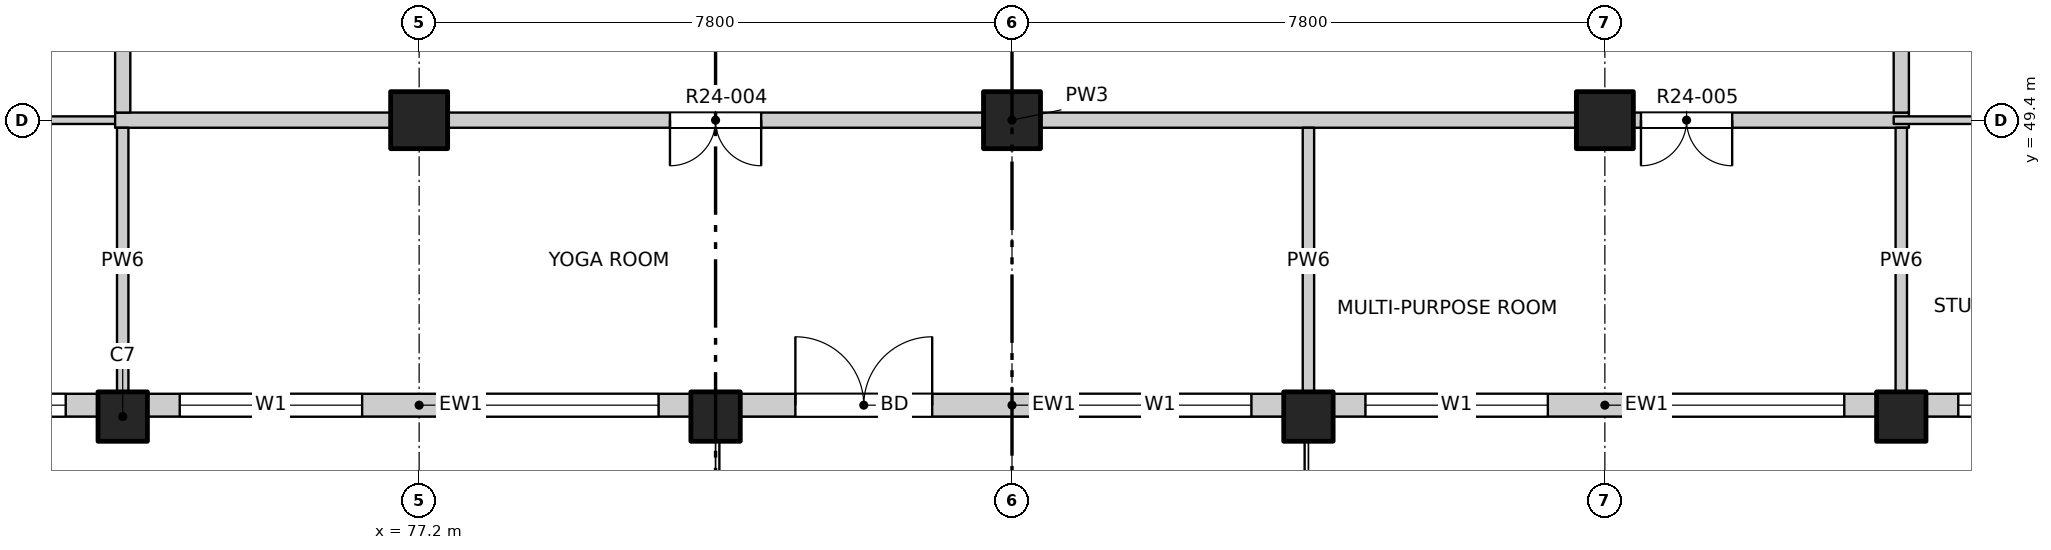
"""IFC4 building model, lengths in metres.
Left out: names, types, materials, properties, quantities, classifications, styles, units other than length and angle.
Written with IfcOpenShell. Run it as: python <this file> out.ifc"""

import sys

from ifc_helpers import new_model, si_unit, direction, frame, frame_2d, origin, origin_2d, place, context, subcontext, project, spatial, rectangle, extrude, element, fill, save


model = new_model("IFC4")
c1 = context("Model", 3, precision=1e-05, world=origin(), true_north=direction((0.0, 1.0)))
c2 = subcontext(c1, "Body", "Model", "MODEL_VIEW")
j1 = project(units=[si_unit("LENGTHUNIT", "METRE"), si_unit("PLANEANGLEUNIT", "RADIAN")], contexts=[c1])
p1 = place(None, origin())
s1 = spatial("IfcSite", under=j1, at=p1, CompositionType="ELEMENT")
p2 = place(p1, origin())
s2 = spatial("IfcBuilding", under=s1, at=p2, CompositionType="ELEMENT")
p3 = place(p2, frame((0.0, 0.0, 249.4)))
s3 = spatial("IfcBuildingStorey", under=s2, at=p3, CompositionType="ELEMENT", Elevation=249.4)
for number, where, z_axis, x_axis in (
    (1, (73.3, 45.5, -0.25), (0.0, 0.0, 1.0), (1.0, 0.0, 0.0)),
    (2, (81.1, 45.5, -0.25), (0.0, 0.0, 1.0), (1.0, 0.0, 0.0)),
    (3, (88.9, 45.5, -0.25), (0.0, 0.0, 1.0), (1.0, 0.0, 0.0)),
    (4, (96.7, 45.5, -0.25), (0.0, 0.0, 1.0), (1.0, 0.0, 0.0)),
):
    element("IfcColumn", number, at=place(p3, frame(where, z_axis=z_axis, x_axis=x_axis)), inside=s3, PredefinedType="COLUMN", context=c2, shape_type="SweptSolid", body=[
        extrude(rectangle(XDim=0.65, YDim=0.65, at=origin_2d()), origin(), (0.0, 0.0, 1.0), 3.4),
    ])
for number, where, z_axis, x_axis in (
    (5, (77.2, 49.4, -0.25), (0.0, 0.0, 1.0), (1.0, 0.0, 0.0)),
    (6, (85.0, 49.4, -0.25), (0.0, 0.0, 1.0), (1.0, 0.0, 0.0)),
    (7, (92.8, 49.4, -0.25), (0.0, 0.0, 1.0), (1.0, 0.0, 0.0)),
):
    element("IfcColumn", number, at=place(p3, frame(where, z_axis=z_axis, x_axis=x_axis)), inside=s3, PredefinedType="COLUMN", context=c2, shape_type="SweptSolid", body=[
        extrude(rectangle(XDim=0.75, YDim=0.75, at=origin_2d()), origin(), (0.0, 0.0, 1.0), 3.4),
    ])
p4 = place(p3, frame((69.4, 45.65, 0.0), z_axis=(0.0, 0.0, 1.0), x_axis=(1.0, 0.0, 0.0)))
e8 = element("IfcWall", 8, at=p4, inside=s3, PredefinedType="SOLIDWALL", context=c2, shape_type="SweptSolid", body=[
    extrude(rectangle(XDim=3.575, YDim=0.3, at=frame_2d((1.788, 0.0))), origin(), (0.0, 0.0, 1.0), 2.7),
])
p5 = place(p4, frame((0.75, 0.0, 0.9)))
e9 = element("IfcOpeningElement", 9, at=p5, cuts=e8, PredefinedType="OPENING", context=c2, shape_type="SweptSolid", body=[
    extrude(rectangle(XDim=2.4, YDim=1.8, at=frame_2d((1.2, 0.9))), frame((0.0, 0.16, 0.0), z_axis=(0.0, -1.0, 0.0), x_axis=(1.0, 0.0, 0.0)), (0.0, 0.0, 1.0), 0.32),
])
p6 = place(p3, frame((73.625, 45.65, 0.0), z_axis=(0.0, 0.0, 1.0), x_axis=(1.0, 0.0, 0.0)))
e10 = element("IfcWall", 10, at=p6, inside=s3, PredefinedType="SOLIDWALL", context=c2, shape_type="SweptSolid", body=[
    extrude(rectangle(XDim=7.15, YDim=0.3, at=frame_2d((3.575, 0.0))), origin(), (0.0, 0.0, 1.0), 2.7),
])
p7 = place(p6, frame((0.425, 0.0, 0.9)))
e11 = element("IfcOpeningElement", 11, at=p7, cuts=e10, PredefinedType="OPENING", context=c2, shape_type="SweptSolid", body=[
    extrude(rectangle(XDim=2.4, YDim=1.8, at=frame_2d((1.2, 0.9))), frame((0.0, 0.16, 0.0), z_axis=(0.0, -1.0, 0.0), x_axis=(1.0, 0.0, 0.0)), (0.0, 0.0, 1.0), 0.32),
])
p8 = place(p6, frame((4.325, 0.0, 0.9)))
e12 = element("IfcOpeningElement", 12, at=p8, cuts=e10, PredefinedType="OPENING", context=c2, shape_type="SweptSolid", body=[
    extrude(rectangle(XDim=2.4, YDim=1.8, at=frame_2d((1.2, 0.9))), frame((0.0, 0.16, 0.0), z_axis=(0.0, -1.0, 0.0), x_axis=(1.0, 0.0, 0.0)), (0.0, 0.0, 1.0), 0.32),
])
p9 = place(p3, frame((81.425, 45.65, 0.0), z_axis=(0.0, 0.0, 1.0), x_axis=(1.0, 0.0, 0.0)))
e13 = element("IfcWall", 13, at=p9, inside=s3, PredefinedType="SOLIDWALL", context=c2, shape_type="SweptSolid", body=[
    extrude(rectangle(XDim=7.15, YDim=0.3, at=frame_2d((3.575, 0.0))), origin(), (0.0, 0.0, 1.0), 2.7),
])
p10 = place(p9, frame((0.725, 0.0, 0.0)))
e14 = element("IfcOpeningElement", 14, at=p10, cuts=e13, PredefinedType="OPENING", context=c2, shape_type="SweptSolid", body=[
    extrude(rectangle(XDim=1.8, YDim=2.4, at=frame_2d((0.9, 1.2))), frame((0.0, 0.16, 0.0), z_axis=(0.0, -1.0, 0.0), x_axis=(1.0, 0.0, 0.0)), (0.0, 0.0, 1.0), 0.32),
])
p11 = place(p9, frame((4.325, 0.0, 0.9)))
e15 = element("IfcOpeningElement", 15, at=p11, cuts=e13, PredefinedType="OPENING", context=c2, shape_type="SweptSolid", body=[
    extrude(rectangle(XDim=2.4, YDim=1.8, at=frame_2d((1.2, 0.9))), frame((0.0, 0.16, 0.0), z_axis=(0.0, -1.0, 0.0), x_axis=(1.0, 0.0, 0.0)), (0.0, 0.0, 1.0), 0.32),
])
p12 = place(p3, frame((89.225, 45.65, 0.0), z_axis=(0.0, 0.0, 1.0), x_axis=(1.0, 0.0, 0.0)))
e16 = element("IfcWall", 16, at=p12, inside=s3, PredefinedType="SOLIDWALL", context=c2, shape_type="SweptSolid", body=[
    extrude(rectangle(XDim=7.15, YDim=0.3, at=frame_2d((3.575, 0.0))), origin(), (0.0, 0.0, 1.0), 2.7),
])
p13 = place(p12, frame((0.425, 0.0, 0.9)))
e17 = element("IfcOpeningElement", 17, at=p13, cuts=e16, PredefinedType="OPENING", context=c2, shape_type="SweptSolid", body=[
    extrude(rectangle(XDim=2.4, YDim=1.8, at=frame_2d((1.2, 0.9))), frame((0.0, 0.16, 0.0), z_axis=(0.0, -1.0, 0.0), x_axis=(1.0, 0.0, 0.0)), (0.0, 0.0, 1.0), 0.32),
])
p14 = place(p12, frame((4.325, 0.0, 0.9)))
e18 = element("IfcOpeningElement", 18, at=p14, cuts=e16, PredefinedType="OPENING", context=c2, shape_type="SweptSolid", body=[
    extrude(rectangle(XDim=2.4, YDim=1.8, at=frame_2d((1.2, 0.9))), frame((0.0, 0.16, 0.0), z_axis=(0.0, -1.0, 0.0), x_axis=(1.0, 0.0, 0.0)), (0.0, 0.0, 1.0), 0.32),
])
p15 = place(p3, frame((97.025, 45.65, 0.0), z_axis=(0.0, 0.0, 1.0), x_axis=(1.0, 0.0, 0.0)))
e19 = element("IfcWall", 19, at=p15, inside=s3, PredefinedType="SOLIDWALL", context=c2, shape_type="SweptSolid", body=[
    extrude(rectangle(XDim=3.575, YDim=0.3, at=frame_2d((1.788, 0.0))), origin(), (0.0, 0.0, 1.0), 2.7),
])
p16 = place(p15, frame((0.425, 0.0, 0.9)))
e20 = element("IfcOpeningElement", 20, at=p16, cuts=e19, PredefinedType="OPENING", context=c2, shape_type="SweptSolid", body=[
    extrude(rectangle(XDim=2.4, YDim=1.8, at=frame_2d((1.2, 0.9))), frame((0.0, 0.16, 0.0), z_axis=(0.0, -1.0, 0.0), x_axis=(1.0, 0.0, 0.0)), (0.0, 0.0, 1.0), 0.32),
])
p17 = place(p3, frame((65.8, 49.4, 0.0), z_axis=(0.0, 0.0, 1.0), x_axis=(1.0, 0.0, 0.0)))
e21 = element("IfcWall", 21, at=p17, inside=s3, PredefinedType="PARTITIONING", context=c2, shape_type="SweptSolid", body=[
    extrude(rectangle(XDim=7.6, YDim=0.1, at=frame_2d((3.8, 0.0))), origin(), (0.0, 0.0, 1.0), 3.15),
])
p18 = place(p17, frame((4.09, 0.0, 0.0)))
e22 = element("IfcOpeningElement", 22, at=p18, cuts=e21, PredefinedType="OPENING", context=c2, shape_type="SweptSolid", body=[
    extrude(rectangle(XDim=0.9, YDim=2.1, at=frame_2d((0.45, 1.05))), frame((0.0, 0.06, 0.0), z_axis=(0.0, -1.0, 0.0), x_axis=(1.0, 0.0, 0.0)), (0.0, 0.0, 1.0), 0.12),
])
p19 = place(p3, frame((73.2, 49.4, 0.0), z_axis=(0.0, 0.0, 1.0), x_axis=(1.0, 0.0, 0.0)))
e23 = element("IfcWall", 23, at=p19, inside=s3, PredefinedType="PARTITIONING", context=c2, shape_type="SweptSolid", body=[
    extrude(rectangle(XDim=23.6, YDim=0.2, at=frame_2d((11.8, 0.0))), origin(), (0.0, 0.0, 1.0), 3.15),
])
p20 = place(p19, frame((7.3, 0.0, 0.0)))
e24 = element("IfcOpeningElement", 24, at=p20, cuts=e23, PredefinedType="OPENING", context=c2, shape_type="SweptSolid", body=[
    extrude(rectangle(XDim=1.2, YDim=2.1, at=frame_2d((0.6, 1.05))), frame((0.0, 0.11, 0.0), z_axis=(0.0, -1.0, 0.0), x_axis=(1.0, 0.0, 0.0)), (0.0, 0.0, 1.0), 0.22),
])
p21 = place(p19, frame((20.075, 0.0, 0.0)))
e25 = element("IfcOpeningElement", 25, at=p21, cuts=e23, PredefinedType="OPENING", context=c2, shape_type="SweptSolid", body=[
    extrude(rectangle(XDim=1.2, YDim=2.1, at=frame_2d((0.6, 1.05))), frame((0.0, 0.11, 0.0), z_axis=(0.0, -1.0, 0.0), x_axis=(1.0, 0.0, 0.0)), (0.0, 0.0, 1.0), 0.22),
])
p22 = place(p3, frame((96.6, 49.4, 0.0), z_axis=(0.0, 0.0, 1.0), x_axis=(1.0, 0.0, 0.0)))
e26 = element("IfcWall", 26, at=p22, inside=s3, PredefinedType="PARTITIONING", context=c2, shape_type="SweptSolid", body=[
    extrude(rectangle(XDim=7.6, YDim=0.1, at=frame_2d((3.8, 0.0))), origin(), (0.0, 0.0, 1.0), 3.15),
])
p23 = place(p22, frame((2.61, 0.0, 0.0)))
e27 = element("IfcOpeningElement", 27, at=p23, cuts=e26, PredefinedType="OPENING", context=c2, shape_type="SweptSolid", body=[
    extrude(rectangle(XDim=0.9, YDim=2.1, at=frame_2d((0.45, 1.05))), frame((0.0, 0.06, 0.0), z_axis=(0.0, -1.0, 0.0), x_axis=(1.0, 0.0, 0.0)), (0.0, 0.0, 1.0), 0.12),
])
p24 = place(p3, frame((73.3, 45.8, 0.0), z_axis=(0.0, 0.0, 1.0), x_axis=(0.0, 1.0, 0.0)))
e28 = element("IfcWall", 28, at=p24, inside=s3, PredefinedType="PARTITIONING", context=c2, shape_type="SweptSolid", body=[
    extrude(rectangle(XDim=3.5, YDim=0.15, at=frame_2d((1.75, 0.0))), origin(), (0.0, 0.0, 1.0), 3.15),
])
p25 = place(p3, frame((73.3, 49.5, 0.0), z_axis=(0.0, 0.0, 1.0), x_axis=(0.0, 1.0, 0.0)))
e29 = element("IfcWall", 29, at=p25, inside=s3, PredefinedType="PARTITIONING", context=c2, shape_type="SweptSolid", body=[
    extrude(rectangle(XDim=34.7, YDim=0.2, at=frame_2d((17.35, 0.0))), origin(), (0.0, 0.0, 1.0), 3.15),
])
p26 = place(p25, frame((3.325, 0.0, 0.0)))
e30 = element("IfcOpeningElement", 30, at=p26, cuts=e29, PredefinedType="OPENING", context=c2, shape_type="SweptSolid", body=[
    extrude(rectangle(XDim=1.0, YDim=2.1, at=frame_2d((0.5, 1.05))), frame((0.0, 0.11, 0.0), z_axis=(0.0, -1.0, 0.0), x_axis=(1.0, 0.0, 0.0)), (0.0, 0.0, 1.0), 0.22),
])
p27 = place(p25, frame((17.875, 0.0, 0.0)))
e31 = element("IfcOpeningElement", 31, at=p27, cuts=e29, PredefinedType="OPENING", context=c2, shape_type="SweptSolid", body=[
    extrude(rectangle(XDim=1.0, YDim=2.1, at=frame_2d((0.5, 1.05))), frame((0.0, 0.11, 0.0), z_axis=(0.0, -1.0, 0.0), x_axis=(1.0, 0.0, 0.0)), (0.0, 0.0, 1.0), 0.22),
])
p28 = place(p25, frame((25.775, 0.0, 0.0)))
e32 = element("IfcOpeningElement", 32, at=p28, cuts=e29, PredefinedType="OPENING", context=c2, shape_type="SweptSolid", body=[
    extrude(rectangle(XDim=1.0, YDim=2.1, at=frame_2d((0.5, 1.05))), frame((0.0, 0.11, 0.0), z_axis=(0.0, -1.0, 0.0), x_axis=(1.0, 0.0, 0.0)), (0.0, 0.0, 1.0), 0.22),
])
p29 = place(p3, frame((88.9, 45.8, 0.0), z_axis=(0.0, 0.0, 1.0), x_axis=(0.0, 1.0, 0.0)))
e33 = element("IfcWall", 33, at=p29, inside=s3, PredefinedType="PARTITIONING", context=c2, shape_type="SweptSolid", body=[
    extrude(rectangle(XDim=3.5, YDim=0.15, at=frame_2d((1.75, 0.0))), origin(), (0.0, 0.0, 1.0), 2.55),
])
p30 = place(p3, frame((96.7, 45.8, 0.0), z_axis=(0.0, 0.0, 1.0), x_axis=(0.0, 1.0, 0.0)))
e34 = element("IfcWall", 34, at=p30, inside=s3, PredefinedType="PARTITIONING", context=c2, shape_type="SweptSolid", body=[
    extrude(rectangle(XDim=3.5, YDim=0.15, at=frame_2d((1.75, 0.0))), origin(), (0.0, 0.0, 1.0), 3.15),
])
p31 = place(p3, frame((96.7, 49.5, 0.0), z_axis=(0.0, 0.0, 1.0), x_axis=(0.0, 1.0, 0.0)))
e35 = element("IfcWall", 35, at=p31, inside=s3, PredefinedType="PARTITIONING", context=c2, shape_type="SweptSolid", body=[
    extrude(rectangle(XDim=34.7, YDim=0.2, at=frame_2d((17.35, 0.0))), origin(), (0.0, 0.0, 1.0), 3.15),
])
p32 = place(p31, frame((3.075, 0.0, 0.0)))
e36 = element("IfcOpeningElement", 36, at=p32, cuts=e35, PredefinedType="OPENING", context=c2, shape_type="SweptSolid", body=[
    extrude(rectangle(XDim=1.0, YDim=2.1, at=frame_2d((0.5, 1.05))), frame((0.0, 0.11, 0.0), z_axis=(0.0, -1.0, 0.0), x_axis=(1.0, 0.0, 0.0)), (0.0, 0.0, 1.0), 0.22),
])
p33 = place(p31, frame((18.425, 0.0, 0.0)))
e37 = element("IfcOpeningElement", 37, at=p33, cuts=e35, PredefinedType="OPENING", context=c2, shape_type="SweptSolid", body=[
    extrude(rectangle(XDim=1.0, YDim=2.1, at=frame_2d((0.5, 1.05))), frame((0.0, 0.11, 0.0), z_axis=(0.0, -1.0, 0.0), x_axis=(1.0, 0.0, 0.0)), (0.0, 0.0, 1.0), 0.22),
])
p34 = place(p31, frame((25.825, 0.0, 0.0)))
e38 = element("IfcOpeningElement", 38, at=p34, cuts=e35, PredefinedType="OPENING", context=c2, shape_type="SweptSolid", body=[
    extrude(rectangle(XDim=1.0, YDim=2.1, at=frame_2d((0.5, 1.05))), frame((0.0, 0.11, 0.0), z_axis=(0.0, -1.0, 0.0), x_axis=(1.0, 0.0, 0.0)), (0.0, 0.0, 1.0), 0.22),
])
p35 = place(p5, origin())
e39 = element("IfcWindow", 39, at=p35, inside=s3, PartitioningType="DOUBLE_PANEL_VERTICAL", PredefinedType="WINDOW", context=c2, shape_type="SweptSolid", body=[
    extrude(rectangle(XDim=2.4, YDim=1.8, at=frame_2d((1.2, 0.9))), frame((0.0, 0.03, 0.0), z_axis=(0.0, -1.0, 0.0), x_axis=(1.0, 0.0, 0.0)), (0.0, 0.0, 1.0), 0.06),
])
fill(e9, e39)
p36 = place(p7, origin())
e40 = element("IfcWindow", 40, at=p36, inside=s3, PartitioningType="DOUBLE_PANEL_VERTICAL", PredefinedType="WINDOW", context=c2, shape_type="SweptSolid", body=[
    extrude(rectangle(XDim=2.4, YDim=1.8, at=frame_2d((1.2, 0.9))), frame((0.0, 0.03, 0.0), z_axis=(0.0, -1.0, 0.0), x_axis=(1.0, 0.0, 0.0)), (0.0, 0.0, 1.0), 0.06),
])
fill(e11, e40)
p37 = place(p8, origin())
e41 = element("IfcWindow", 41, at=p37, inside=s3, PartitioningType="DOUBLE_PANEL_VERTICAL", PredefinedType="WINDOW", context=c2, shape_type="SweptSolid", body=[
    extrude(rectangle(XDim=2.4, YDim=1.8, at=frame_2d((1.2, 0.9))), frame((0.0, 0.03, 0.0), z_axis=(0.0, -1.0, 0.0), x_axis=(1.0, 0.0, 0.0)), (0.0, 0.0, 1.0), 0.06),
])
fill(e12, e41)
p38 = place(p10, origin())
e42 = element("IfcDoor", 42, at=p38, inside=s3, OperationType="DOUBLE_DOOR_SINGLE_SWING", PredefinedType="DOOR", context=c2, shape_type="SweptSolid", body=[
    extrude(rectangle(XDim=1.8, YDim=2.4, at=frame_2d((0.9, 1.2))), frame((0.0, 0.025, 0.0), z_axis=(0.0, -1.0, 0.0), x_axis=(1.0, 0.0, 0.0)), (0.0, 0.0, 1.0), 0.05),
])
fill(e14, e42)
p39 = place(p11, origin())
e43 = element("IfcWindow", 43, at=p39, inside=s3, PartitioningType="DOUBLE_PANEL_VERTICAL", PredefinedType="WINDOW", context=c2, shape_type="SweptSolid", body=[
    extrude(rectangle(XDim=2.4, YDim=1.8, at=frame_2d((1.2, 0.9))), frame((0.0, 0.03, 0.0), z_axis=(0.0, -1.0, 0.0), x_axis=(1.0, 0.0, 0.0)), (0.0, 0.0, 1.0), 0.06),
])
fill(e15, e43)
p40 = place(p13, origin())
e44 = element("IfcWindow", 44, at=p40, inside=s3, PartitioningType="DOUBLE_PANEL_VERTICAL", PredefinedType="WINDOW", context=c2, shape_type="SweptSolid", body=[
    extrude(rectangle(XDim=2.4, YDim=1.8, at=frame_2d((1.2, 0.9))), frame((0.0, 0.03, 0.0), z_axis=(0.0, -1.0, 0.0), x_axis=(1.0, 0.0, 0.0)), (0.0, 0.0, 1.0), 0.06),
])
fill(e17, e44)
p41 = place(p14, origin())
e45 = element("IfcWindow", 45, at=p41, inside=s3, PartitioningType="DOUBLE_PANEL_VERTICAL", PredefinedType="WINDOW", context=c2, shape_type="SweptSolid", body=[
    extrude(rectangle(XDim=2.4, YDim=1.8, at=frame_2d((1.2, 0.9))), frame((0.0, 0.03, 0.0), z_axis=(0.0, -1.0, 0.0), x_axis=(1.0, 0.0, 0.0)), (0.0, 0.0, 1.0), 0.06),
])
fill(e18, e45)
p42 = place(p16, origin())
e46 = element("IfcWindow", 46, at=p42, inside=s3, PartitioningType="DOUBLE_PANEL_VERTICAL", PredefinedType="WINDOW", context=c2, shape_type="SweptSolid", body=[
    extrude(rectangle(XDim=2.4, YDim=1.8, at=frame_2d((1.2, 0.9))), frame((0.0, 0.03, 0.0), z_axis=(0.0, -1.0, 0.0), x_axis=(1.0, 0.0, 0.0)), (0.0, 0.0, 1.0), 0.06),
])
fill(e20, e46)
p43 = place(p20, origin())
e47 = element("IfcDoor", 47, at=p43, inside=s3, OperationType="DOUBLE_DOOR_SINGLE_SWING", PredefinedType="DOOR", context=c2, shape_type="SweptSolid", body=[
    extrude(rectangle(XDim=1.2, YDim=2.1, at=frame_2d((0.6, 1.05))), frame((0.0, 0.025, 0.0), z_axis=(0.0, -1.0, 0.0), x_axis=(1.0, 0.0, 0.0)), (0.0, 0.0, 1.0), 0.05),
])
fill(e24, e47)
p44 = place(p21, origin())
e48 = element("IfcDoor", 48, at=p44, inside=s3, OperationType="DOUBLE_DOOR_SINGLE_SWING", PredefinedType="DOOR", context=c2, shape_type="SweptSolid", body=[
    extrude(rectangle(XDim=1.2, YDim=2.1, at=frame_2d((0.6, 1.05))), frame((0.0, 0.025, 0.0), z_axis=(0.0, -1.0, 0.0), x_axis=(1.0, 0.0, 0.0)), (0.0, 0.0, 1.0), 0.05),
])
fill(e25, e48)
save(model, sys.argv[1])
